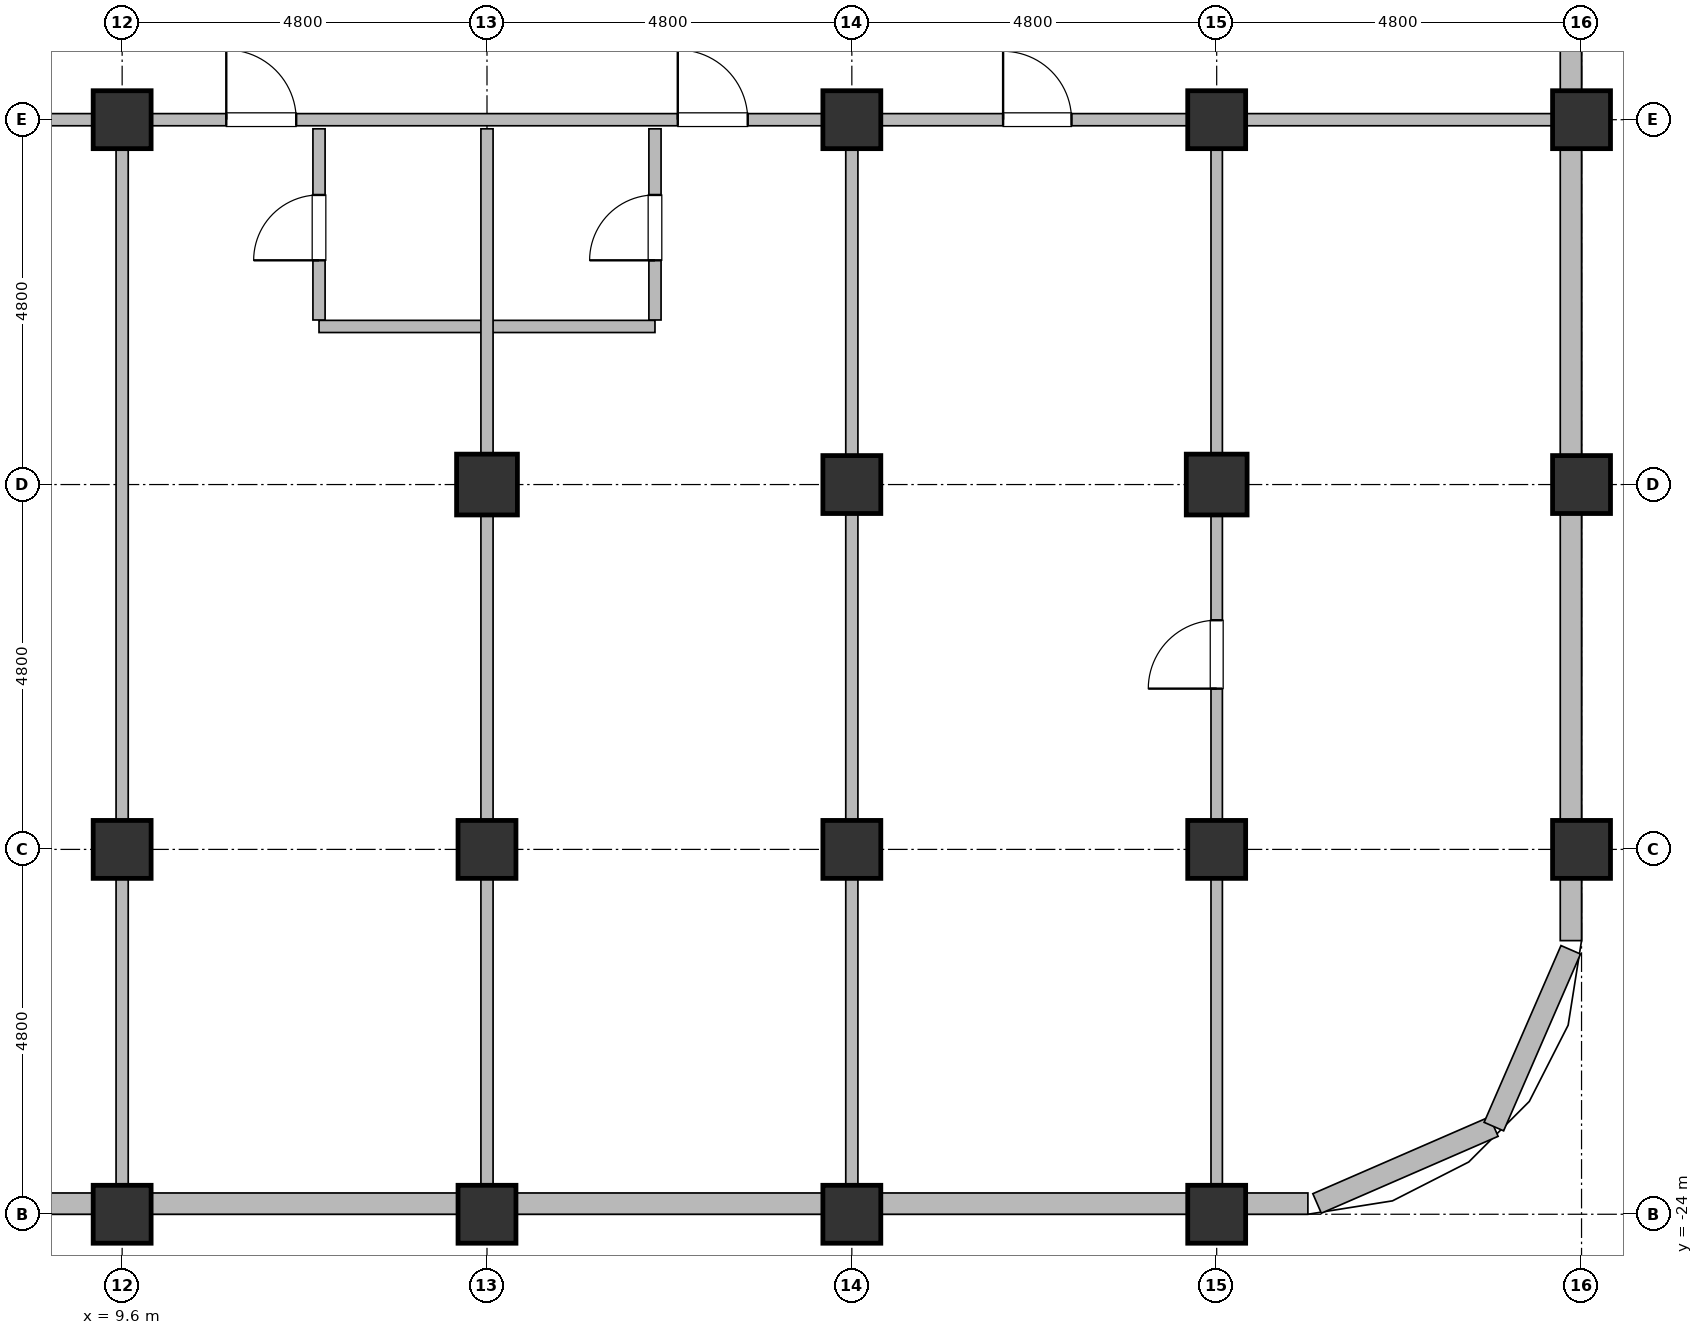
"""IFC4 building model, lengths in metres.
Left out: names, types, materials, properties, quantities, classifications, styles, units other than length and angle.
Written with IfcOpenShell. Run it as: python <this file> out.ifc"""

import sys

from ifc_helpers import new_model, si_unit, direction, frame, frame_2d, origin, origin_2d, place, context, subcontext, project, spatial, rectangle, hollow_rectangle, hollow_circle, extrude, element, fill, save


model = new_model("IFC4")
c1 = context("Model", 3, precision=1e-05, world=origin(), true_north=direction((0.0, 1.0)))
c2 = subcontext(c1, "Body", "Model", "MODEL_VIEW")
j1 = project(units=[si_unit("LENGTHUNIT", "METRE"), si_unit("PLANEANGLEUNIT", "RADIAN")], contexts=[c1])
p1 = place(None, origin())
s1 = spatial("IfcSite", under=j1, at=p1, CompositionType="ELEMENT")
p2 = place(p1, origin())
s2 = spatial("IfcBuilding", under=s1, at=p2, CompositionType="ELEMENT")
p3 = place(p2, frame((0.0, 0.0, 48.5)))
s3 = spatial("IfcBuildingStorey", under=s2, at=p3, CompositionType="ELEMENT", Elevation=48.5)
for number, where, z_axis, x_axis in (
    (1, (9.6, -24.0, 0.0), (0.0, 0.0, 1.0), (1.0, 0.0, 0.0)),
    (2, (9.6, -19.2, 0.0), (0.0, 0.0, 1.0), (1.0, 0.0, 0.0)),
    (3, (9.6, -9.6, 0.0), (0.0, 0.0, 1.0), (1.0, 0.0, 0.0)),
    (4, (14.4, -24.0, 0.0), (0.0, 0.0, 1.0), (1.0, 0.0, 0.0)),
    (5, (14.4, -19.2, 0.0), (0.0, 0.0, 1.0), (1.0, 0.0, 0.0)),
):
    element("IfcColumn", number, at=place(p3, frame(where, z_axis=z_axis, x_axis=x_axis)), inside=s3, PredefinedType="COLUMN", context=c2, shape_type="SweptSolid", body=[
        extrude(hollow_circle(Radius=0.381, WallThickness=0.032, at=origin_2d()), origin(), (0.0, 0.0, 1.0), 3.7),
    ])
p4 = place(p3, frame((14.4, -14.4, 0.0), z_axis=(0.0, 0.0, 1.0), x_axis=(1.0, 0.0, 0.0)))
e6 = element("IfcColumn", 6, at=p4, inside=s3, PredefinedType="COLUMN", context=c2, shape_type="SweptSolid", body=[
    extrude(hollow_rectangle(XDim=0.8, YDim=0.8, WallThickness=0.036, at=origin_2d()), origin(), (0.0, 0.0, 1.0), 3.7),
])
for number, where, z_axis, x_axis in (
    (7, (19.2, -24.0, 0.0), (0.0, 0.0, 1.0), (1.0, 0.0, 0.0)),
    (8, (19.2, -19.2, 0.0), (0.0, 0.0, 1.0), (1.0, 0.0, 0.0)),
    (9, (19.2, -14.4, 0.0), (0.0, 0.0, 1.0), (1.0, 0.0, 0.0)),
    (10, (19.2, -9.6, 0.0), (0.0, 0.0, 1.0), (1.0, 0.0, 0.0)),
    (11, (24.0, -24.0, 0.0), (0.0, 0.0, 1.0), (1.0, 0.0, 0.0)),
    (12, (24.0, -19.2, 0.0), (0.0, 0.0, 1.0), (1.0, 0.0, 0.0)),
):
    element("IfcColumn", number, at=place(p3, frame(where, z_axis=z_axis, x_axis=x_axis)), inside=s3, PredefinedType="COLUMN", context=c2, shape_type="SweptSolid", body=[
        extrude(hollow_circle(Radius=0.381, WallThickness=0.032, at=origin_2d()), origin(), (0.0, 0.0, 1.0), 3.7),
    ])
p5 = place(p3, frame((24.0, -14.4, 0.0), z_axis=(0.0, 0.0, 1.0), x_axis=(1.0, 0.0, 0.0)))
e13 = element("IfcColumn", 13, at=p5, inside=s3, PredefinedType="COLUMN", context=c2, shape_type="SweptSolid", body=[
    extrude(hollow_rectangle(XDim=0.8, YDim=0.8, WallThickness=0.036, at=origin_2d()), origin(), (0.0, 0.0, 1.0), 3.7),
])
for number, where, z_axis, x_axis in (
    (14, (24.0, -9.6, 0.0), (0.0, 0.0, 1.0), (1.0, 0.0, 0.0)),
    (15, (28.8, -19.2, 0.0), (0.0, 0.0, 1.0), (1.0, 0.0, 0.0)),
    (16, (28.8, -14.4, 0.0), (0.0, 0.0, 1.0), (1.0, 0.0, 0.0)),
    (17, (28.8, -9.6, 0.0), (0.0, 0.0, 1.0), (1.0, 0.0, 0.0)),
):
    element("IfcColumn", number, at=place(p3, frame(where, z_axis=z_axis, x_axis=x_axis)), inside=s3, PredefinedType="COLUMN", context=c2, shape_type="SweptSolid", body=[
        extrude(hollow_circle(Radius=0.381, WallThickness=0.032, at=origin_2d()), origin(), (0.0, 0.0, 1.0), 3.7),
    ])
p6 = place(p3, frame((25.321, -23.858, 0.0), z_axis=(0.0, 0.0, 1.0), x_axis=(0.917060872934, 0.398747232384, 0.0)))
e18 = element("IfcWall", 18, at=p6, inside=s3, PredefinedType="SOLIDWALL", context=c2, shape_type="SweptSolid", body=[
    extrude(rectangle(XDim=2.536, YDim=0.28, at=frame_2d((1.268, 0.0))), origin(), (0.0, 0.0, 1.0), 2.12),
])
p7 = place(p3, frame((27.646, -22.847, 0.0), z_axis=(0.0, 0.0, 1.0), x_axis=(0.398792985289, 0.917040977756, 0.0)))
e19 = element("IfcWall", 19, at=p7, inside=s3, PredefinedType="SOLIDWALL", context=c2, shape_type="SweptSolid", body=[
    extrude(rectangle(XDim=2.536, YDim=0.28, at=frame_2d((1.268, 0.0))), origin(), (0.0, 0.0, 1.0), 2.12),
])
p8 = place(p3, frame((4.75, -23.86, 0.0), z_axis=(0.0, 0.0, 1.0), x_axis=(1.0, 0.0, 0.0)))
e20 = element("IfcWall", 20, at=p8, inside=s3, PredefinedType="SOLIDWALL", context=c2, shape_type="SweptSolid", body=[
    extrude(rectangle(XDim=20.45, YDim=0.28, at=frame_2d((10.225, 0.0))), origin(), (0.0, 0.0, 1.0), 2.12),
])
p9 = place(p8, frame((1.55, 0.0, 0.75)))
e21 = element("IfcOpeningElement", 21, at=p9, cuts=e20, PredefinedType="OPENING", context=c2, shape_type="SweptSolid", body=[
    extrude(rectangle(XDim=1.8, YDim=1.15, at=frame_2d((0.9, 0.575))), frame((0.0, 0.155, 0.0), z_axis=(0.0, -1.0, 0.0), x_axis=(1.0, 0.0, 0.0)), (0.0, 0.0, 1.0), 0.31),
])
p10 = place(p8, frame((6.35, 0.0, 0.75)))
e22 = element("IfcOpeningElement", 22, at=p10, cuts=e20, PredefinedType="OPENING", context=c2, shape_type="SweptSolid", body=[
    extrude(rectangle(XDim=1.8, YDim=1.15, at=frame_2d((0.9, 0.575))), frame((0.0, 0.155, 0.0), z_axis=(0.0, -1.0, 0.0), x_axis=(1.0, 0.0, 0.0)), (0.0, 0.0, 1.0), 0.31),
])
p11 = place(p8, frame((11.15, 0.0, 0.75)))
e23 = element("IfcOpeningElement", 23, at=p11, cuts=e20, PredefinedType="OPENING", context=c2, shape_type="SweptSolid", body=[
    extrude(rectangle(XDim=1.8, YDim=1.15, at=frame_2d((0.9, 0.575))), frame((0.0, 0.155, 0.0), z_axis=(0.0, -1.0, 0.0), x_axis=(1.0, 0.0, 0.0)), (0.0, 0.0, 1.0), 0.31),
])
p12 = place(p3, frame((28.66, -20.4, 0.0), z_axis=(0.0, 0.0, 1.0), x_axis=(0.0, 1.0, 0.0)))
e24 = element("IfcWall", 24, at=p12, inside=s3, PredefinedType="SOLIDWALL", context=c2, shape_type="SweptSolid", body=[
    extrude(rectangle(XDim=20.38, YDim=0.28, at=frame_2d((10.19, 0.0))), origin(), (0.0, 0.0, 1.0), 2.12),
])
p13 = place(p12, frame((17.25, 0.0, 0.75)))
e25 = element("IfcOpeningElement", 25, at=p13, cuts=e24, PredefinedType="OPENING", context=c2, shape_type="SweptSolid", body=[
    extrude(rectangle(XDim=1.5, YDim=1.15, at=frame_2d((0.75, 0.575))), frame((0.0, 0.155, 0.0), z_axis=(0.0, -1.0, 0.0), x_axis=(1.0, 0.0, 0.0)), (0.0, 0.0, 1.0), 0.31),
])
p14 = place(p3, frame((12.19, -12.32, 0.0), z_axis=(0.0, 0.0, 1.0), x_axis=(1.0, 0.0, 0.0)))
e26 = element("IfcWall", 26, at=p14, inside=s3, PredefinedType="PARTITIONING", context=c2, shape_type="SweptSolid", body=[
    extrude(rectangle(XDim=4.42, YDim=0.16, at=frame_2d((2.21, 0.0))), origin(), (0.0, 0.0, 1.0), 2.82),
])
p15 = place(p3, frame((-33.31, -9.6, 0.0), z_axis=(0.0, 0.0, 1.0), x_axis=(1.0, 0.0, 0.0)))
e27 = element("IfcWall", 27, at=p15, inside=s3, PredefinedType="PARTITIONING", context=c2, shape_type="SweptSolid", body=[
    extrude(rectangle(XDim=61.82, YDim=0.16, at=frame_2d((30.91, 0.0))), origin(), (0.0, 0.0, 1.0), 2.62),
])
p16 = place(p15, frame((6.42, 0.0, 0.0)))
e28 = element("IfcOpeningElement", 28, at=p16, cuts=e27, PredefinedType="OPENING", context=c2, shape_type="SweptSolid", body=[
    extrude(rectangle(XDim=0.9, YDim=2.1, at=frame_2d((0.45, 1.05))), frame((0.0, 0.095, 0.0), z_axis=(0.0, -1.0, 0.0), x_axis=(1.0, 0.0, 0.0)), (0.0, 0.0, 1.0), 0.19),
])
p17 = place(p15, frame((54.5, 0.0, 0.0)))
e29 = element("IfcOpeningElement", 29, at=p17, cuts=e27, PredefinedType="OPENING", context=c2, shape_type="SweptSolid", body=[
    extrude(rectangle(XDim=0.9, YDim=2.1, at=frame_2d((0.45, 1.05))), frame((0.0, 0.095, 0.0), z_axis=(0.0, -1.0, 0.0), x_axis=(1.0, 0.0, 0.0)), (0.0, 0.0, 1.0), 0.19),
])
p18 = place(p15, frame((11.26, 0.0, 0.0)))
e30 = element("IfcOpeningElement", 30, at=p18, cuts=e27, PredefinedType="OPENING", context=c2, shape_type="SweptSolid", body=[
    extrude(rectangle(XDim=0.9, YDim=2.1, at=frame_2d((0.45, 1.05))), frame((0.0, 0.095, 0.0), z_axis=(0.0, -1.0, 0.0), x_axis=(1.0, 0.0, 0.0)), (0.0, 0.0, 1.0), 0.19),
])
p19 = place(p15, frame((30.425, 0.0, 0.0)))
e31 = element("IfcOpeningElement", 31, at=p19, cuts=e27, PredefinedType="OPENING", context=c2, shape_type="SweptSolid", body=[
    extrude(rectangle(XDim=1.05, YDim=2.2, at=frame_2d((0.525, 1.1))), frame((0.0, 0.095, 0.0), z_axis=(0.0, -1.0, 0.0), x_axis=(1.0, 0.0, 0.0)), (0.0, 0.0, 1.0), 0.19),
])
p20 = place(p15, frame((40.62, 0.0, 0.0)))
e32 = element("IfcOpeningElement", 32, at=p20, cuts=e27, PredefinedType="OPENING", context=c2, shape_type="SweptSolid", body=[
    extrude(rectangle(XDim=0.92, YDim=2.15, at=frame_2d((0.46, 1.075))), frame((0.0, 0.095, 0.0), z_axis=(0.0, -1.0, 0.0), x_axis=(1.0, 0.0, 0.0)), (0.0, 0.0, 1.0), 0.19),
])
p21 = place(p15, frame((44.28, 0.0, 0.0)))
e33 = element("IfcOpeningElement", 33, at=p21, cuts=e27, PredefinedType="OPENING", context=c2, shape_type="SweptSolid", body=[
    extrude(rectangle(XDim=0.92, YDim=2.15, at=frame_2d((0.46, 1.075))), frame((0.0, 0.095, 0.0), z_axis=(0.0, -1.0, 0.0), x_axis=(1.0, 0.0, 0.0)), (0.0, 0.0, 1.0), 0.19),
])
p22 = place(p15, frame((50.22, 0.0, 0.0)))
e34 = element("IfcOpeningElement", 34, at=p22, cuts=e27, PredefinedType="OPENING", context=c2, shape_type="SweptSolid", body=[
    extrude(rectangle(XDim=0.92, YDim=2.15, at=frame_2d((0.46, 1.075))), frame((0.0, 0.095, 0.0), z_axis=(0.0, -1.0, 0.0), x_axis=(1.0, 0.0, 0.0)), (0.0, 0.0, 1.0), 0.19),
])
p23 = place(p3, frame((9.6, -23.71, 0.0), z_axis=(0.0, 0.0, 1.0), x_axis=(0.0, 1.0, 0.0)))
e35 = element("IfcWall", 35, at=p23, inside=s3, PredefinedType="PARTITIONING", context=c2, shape_type="SweptSolid", body=[
    extrude(rectangle(XDim=13.99, YDim=0.16, at=frame_2d((6.995, 0.0))), origin(), (0.0, 0.0, 1.0), 2.62),
])
p24 = place(p3, frame((12.19, -12.235, 0.0), z_axis=(0.0, 0.0, 1.0), x_axis=(0.0, 1.0, 0.0)))
e36 = element("IfcWall", 36, at=p24, inside=s3, PredefinedType="PARTITIONING", context=c2, shape_type="SweptSolid", body=[
    extrude(rectangle(XDim=2.515, YDim=0.16, at=frame_2d((1.258, 0.0))), origin(), (0.0, 0.0, 1.0), 2.62),
])
p25 = place(p24, frame((0.785, 0.0, 0.0)))
e37 = element("IfcOpeningElement", 37, at=p25, cuts=e36, PredefinedType="OPENING", context=c2, shape_type="SweptSolid", body=[
    extrude(rectangle(XDim=0.86, YDim=2.1, at=frame_2d((0.43, 1.05))), frame((0.0, 0.095, 0.0), z_axis=(0.0, -1.0, 0.0), x_axis=(1.0, 0.0, 0.0)), (0.0, 0.0, 1.0), 0.19),
])
p26 = place(p3, frame((14.4, -23.71, 0.0), z_axis=(0.0, 0.0, 1.0), x_axis=(0.0, 1.0, 0.0)))
e38 = element("IfcWall", 38, at=p26, inside=s3, PredefinedType="PARTITIONING", context=c2, shape_type="SweptSolid", body=[
    extrude(rectangle(XDim=13.99, YDim=0.16, at=frame_2d((6.995, 0.0))), origin(), (0.0, 0.0, 1.0), 2.62),
])
p27 = place(p3, frame((16.61, -12.235, 0.0), z_axis=(0.0, 0.0, 1.0), x_axis=(0.0, 1.0, 0.0)))
e39 = element("IfcWall", 39, at=p27, inside=s3, PredefinedType="PARTITIONING", context=c2, shape_type="SweptSolid", body=[
    extrude(rectangle(XDim=2.515, YDim=0.16, at=frame_2d((1.258, 0.0))), origin(), (0.0, 0.0, 1.0), 2.62),
])
p28 = place(p27, frame((0.785, 0.0, 0.0)))
e40 = element("IfcOpeningElement", 40, at=p28, cuts=e39, PredefinedType="OPENING", context=c2, shape_type="SweptSolid", body=[
    extrude(rectangle(XDim=0.86, YDim=2.1, at=frame_2d((0.43, 1.05))), frame((0.0, 0.095, 0.0), z_axis=(0.0, -1.0, 0.0), x_axis=(1.0, 0.0, 0.0)), (0.0, 0.0, 1.0), 0.19),
])
p29 = place(p3, frame((19.2, -23.71, 0.0), z_axis=(0.0, 0.0, 1.0), x_axis=(0.0, 1.0, 0.0)))
e41 = element("IfcWall", 41, at=p29, inside=s3, PredefinedType="PARTITIONING", context=c2, shape_type="SweptSolid", body=[
    extrude(rectangle(XDim=13.99, YDim=0.16, at=frame_2d((6.995, 0.0))), origin(), (0.0, 0.0, 1.0), 2.62),
])
p30 = place(p3, frame((24.0, -23.71, 0.0), z_axis=(0.0, 0.0, 1.0), x_axis=(0.0, 1.0, 0.0)))
e42 = element("IfcWall", 42, at=p30, inside=s3, PredefinedType="PARTITIONING", context=c2, shape_type="SweptSolid", body=[
    extrude(rectangle(XDim=13.99, YDim=0.15, at=frame_2d((6.995, 0.0))), origin(), (0.0, 0.0, 1.0), 2.12),
])
p31 = place(p30, frame((6.625, 0.0, 0.0)))
e43 = element("IfcOpeningElement", 43, at=p31, cuts=e42, PredefinedType="OPENING", context=c2, shape_type="SweptSolid", body=[
    extrude(rectangle(XDim=0.9, YDim=2.02, at=frame_2d((0.45, 1.01))), frame((0.0, 0.09, 0.0), z_axis=(0.0, -1.0, 0.0), x_axis=(1.0, 0.0, 0.0)), (0.0, 0.0, 1.0), 0.18),
])
p32 = place(p10, origin())
e44 = element("IfcWindow", 44, at=p32, inside=s3, PartitioningType="SINGLE_PANEL", PredefinedType="WINDOW", context=c2, shape_type="SweptSolid", body=[
    extrude(rectangle(XDim=1.8, YDim=1.15, at=frame_2d((0.9, 0.575))), frame((0.0, 0.03, 0.0), z_axis=(0.0, -1.0, 0.0), x_axis=(1.0, 0.0, 0.0)), (0.0, 0.0, 1.0), 0.06),
])
fill(e22, e44)
p33 = place(p11, origin())
e45 = element("IfcWindow", 45, at=p33, inside=s3, PartitioningType="SINGLE_PANEL", PredefinedType="WINDOW", context=c2, shape_type="SweptSolid", body=[
    extrude(rectangle(XDim=1.8, YDim=1.15, at=frame_2d((0.9, 0.575))), frame((0.0, 0.03, 0.0), z_axis=(0.0, -1.0, 0.0), x_axis=(1.0, 0.0, 0.0)), (0.0, 0.0, 1.0), 0.06),
])
fill(e23, e45)
p34 = place(p17, origin())
e46 = element("IfcDoor", 46, at=p34, inside=s3, OperationType="SINGLE_SWING_RIGHT", PredefinedType="DOOR", context=c2, shape_type="SweptSolid", body=[
    extrude(rectangle(XDim=0.9, YDim=2.1, at=frame_2d((0.45, 1.05))), frame((0.0, 0.025, 0.0), z_axis=(0.0, -1.0, 0.0), x_axis=(1.0, 0.0, 0.0)), (0.0, 0.0, 1.0), 0.05),
])
fill(e29, e46)
p35 = place(p31, origin())
e47 = element("IfcDoor", 47, at=p35, inside=s3, OperationType="SINGLE_SWING_RIGHT", PredefinedType="DOOR", context=c2, shape_type="SweptSolid", body=[
    extrude(rectangle(XDim=0.9, YDim=2.02, at=frame_2d((0.45, 1.01))), frame((0.0, 0.025, 0.0), z_axis=(0.0, -1.0, 0.0), x_axis=(1.0, 0.0, 0.0)), (0.0, 0.0, 1.0), 0.05),
])
fill(e43, e47)
p36 = place(p21, origin())
e48 = element("IfcDoor", 48, at=p36, inside=s3, OperationType="SINGLE_SWING_RIGHT", PredefinedType="DOOR", context=c2, shape_type="SweptSolid", body=[
    extrude(rectangle(XDim=0.92, YDim=2.15, at=frame_2d((0.46, 1.075))), frame((0.0, 0.025, 0.0), z_axis=(0.0, -1.0, 0.0), x_axis=(1.0, 0.0, 0.0)), (0.0, 0.0, 1.0), 0.05),
])
fill(e33, e48)
p37 = place(p25, origin())
e49 = element("IfcDoor", 49, at=p37, inside=s3, OperationType="SINGLE_SWING_LEFT", PredefinedType="DOOR", context=c2, shape_type="SweptSolid", body=[
    extrude(rectangle(XDim=0.86, YDim=2.1, at=frame_2d((0.43, 1.05))), frame((0.0, 0.025, 0.0), z_axis=(0.0, -1.0, 0.0), x_axis=(1.0, 0.0, 0.0)), (0.0, 0.0, 1.0), 0.05),
])
fill(e37, e49)
p38 = place(p22, origin())
e50 = element("IfcDoor", 50, at=p38, inside=s3, OperationType="SINGLE_SWING_RIGHT", PredefinedType="DOOR", context=c2, shape_type="SweptSolid", body=[
    extrude(rectangle(XDim=0.92, YDim=2.15, at=frame_2d((0.46, 1.075))), frame((0.0, 0.025, 0.0), z_axis=(0.0, -1.0, 0.0), x_axis=(1.0, 0.0, 0.0)), (0.0, 0.0, 1.0), 0.05),
])
fill(e34, e50)
p39 = place(p28, origin())
e51 = element("IfcDoor", 51, at=p39, inside=s3, OperationType="SINGLE_SWING_LEFT", PredefinedType="DOOR", context=c2, shape_type="SweptSolid", body=[
    extrude(rectangle(XDim=0.86, YDim=2.1, at=frame_2d((0.43, 1.05))), frame((0.0, 0.025, 0.0), z_axis=(0.0, -1.0, 0.0), x_axis=(1.0, 0.0, 0.0)), (0.0, 0.0, 1.0), 0.05),
])
fill(e40, e51)
save(model, sys.argv[1])
